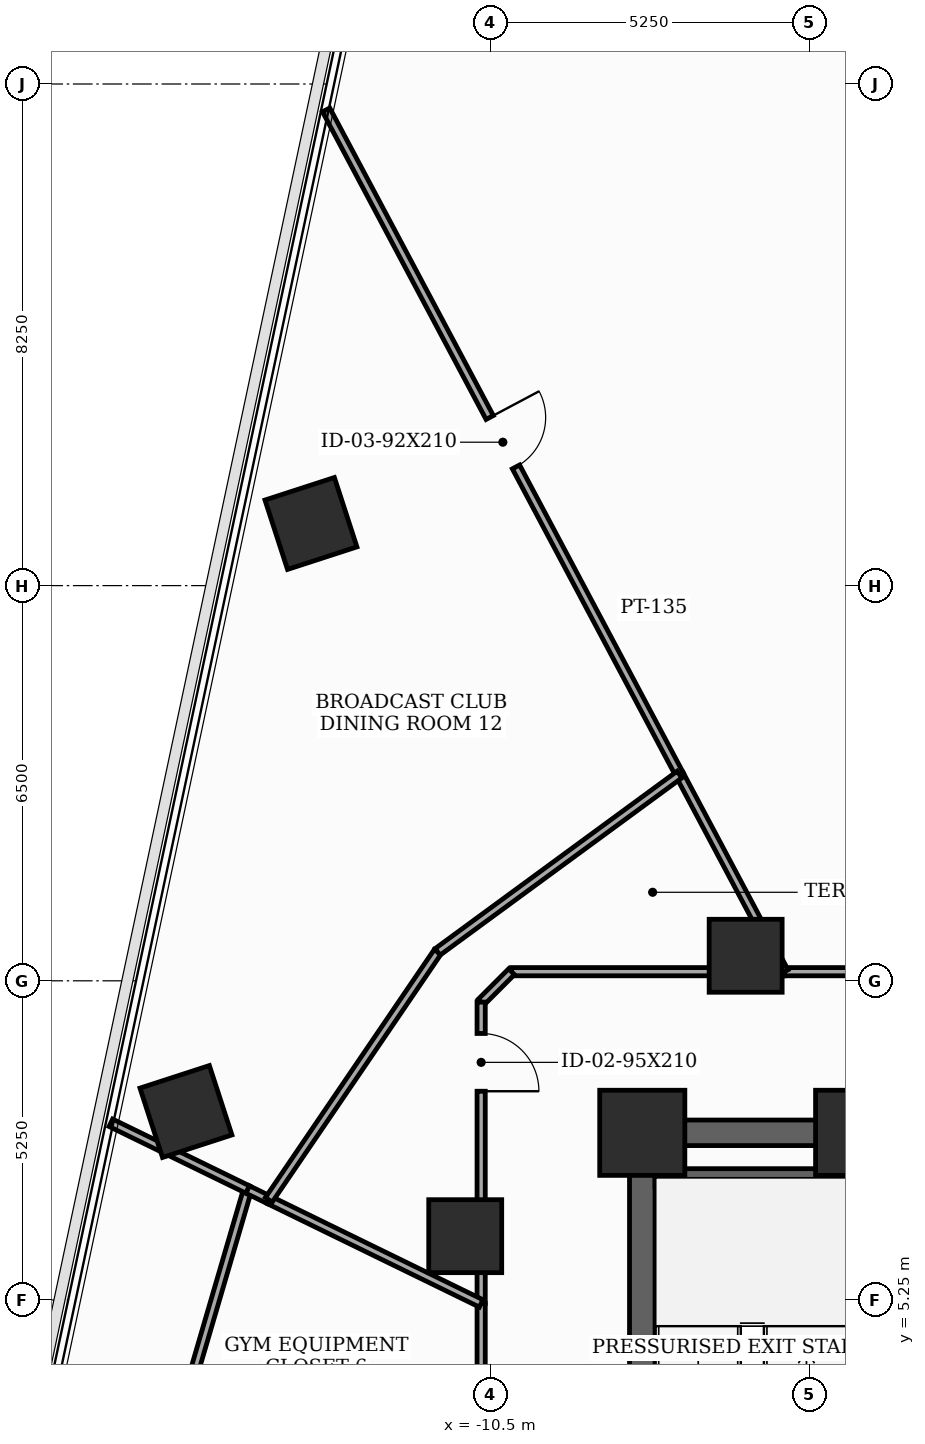
"""IFC4 building model, lengths in metres.
Left out: names, types, materials, properties, quantities, classifications, styles, units other than length and angle.
Written with IfcOpenShell. Run it as: python <this file> out.ifc"""

import sys

from ifc_helpers import new_model, si_unit, direction, frame, frame_2d, origin, origin_2d, place, context, subcontext, project, spatial, rectangle, extrude, element, fill, save


model = new_model("IFC4")
c1 = context("Model", 3, precision=1e-05, world=origin(), true_north=direction((0.0, 1.0)))
c2 = subcontext(c1, "Body", "Model", "MODEL_VIEW")
j1 = project(units=[si_unit("LENGTHUNIT", "METRE"), si_unit("PLANEANGLEUNIT", "RADIAN")], contexts=[c1])
p1 = place(None, origin())
s1 = spatial("IfcSite", under=j1, at=p1, CompositionType="ELEMENT")
p2 = place(p1, origin())
s2 = spatial("IfcBuilding", under=s1, at=p2, CompositionType="ELEMENT")
p3 = place(p2, frame((0.0, 0.0, 101.4)))
s3 = spatial("IfcBuildingStorey", under=s2, at=p3, CompositionType="ELEMENT", Elevation=101.4)
for number, where, z_axis, x_axis in (
    (1, (-4.45, 8.0, 0.0), (0.0, 0.0, 1.0), (1.0, 0.0, 0.0)),
    (2, (-8.0, 8.0, 0.0), (0.0, 0.0, 1.0), (1.0, 0.0, 0.0)),
):
    element("IfcColumn", number, at=place(p3, frame(where, z_axis=z_axis, x_axis=x_axis)), inside=s3, PredefinedType="COLUMN", context=c2, shape_type="SweptSolid", body=[
        extrude(rectangle(XDim=1.4, YDim=1.4, at=origin_2d()), origin(), (0.0, 0.0, 1.0), 3.7),
    ])
for number, where, z_axis, x_axis in (
    (3, (-6.3, 10.912, 0.0), (0.0, 0.0, 1.0), (1.0, 0.0, 0.0)),
    (4, (-10.912, 6.3, 0.0), (0.0, 0.0, 1.0), (1.0, 0.0, 0.0)),
    (5, (-13.449, 18.022, 0.0), (0.0, 0.0, 1.0), (0.951, 0.309, 0.0)),
    (6, (-15.505, 8.35, 0.0), (0.0, 0.0, 1.0), (0.951, 0.309, 0.0)),
):
    element("IfcColumn", number, at=place(p3, frame(where, z_axis=z_axis, x_axis=x_axis)), inside=s3, PredefinedType="COLUMN", context=c2, shape_type="SweptSolid", body=[
        extrude(rectangle(XDim=1.2, YDim=1.2, at=origin_2d()), origin(), (0.0, 0.0, 1.0), 3.7),
    ])
p4 = place(p3, frame((-8.0, -8.0, 0.0), z_axis=(0.0, 0.0, 1.0), x_axis=(0.0, 1.0, 0.0)))
e7 = element("IfcWall", 7, at=p4, inside=s3, PredefinedType="SHEAR", context=c2, shape_type="SweptSolid", body=[
    extrude(rectangle(XDim=16.0, YDim=0.42, at=frame_2d((8.0, 0.0))), origin(), (0.0, 0.0, 1.0), 3.5),
])
p5 = place(p4, frame((0.922, 0.0, 0.0)))
e8 = element("IfcOpeningElement", 8, at=p5, cuts=e7, PredefinedType="OPENING", context=c2, shape_type="SweptSolid", body=[
    extrude(rectangle(XDim=0.85, YDim=2.02, at=frame_2d((0.425, 1.01))), frame((0.0, 0.22, 0.0), z_axis=(0.0, -1.0, 0.0), x_axis=(1.0, 0.0, 0.0)), (0.0, 0.0, 1.0), 0.44),
])
p6 = place(p4, frame((5.35, 0.0, 0.0)))
e9 = element("IfcOpeningElement", 9, at=p6, cuts=e7, PredefinedType="OPENING", context=c2, shape_type="SweptSolid", body=[
    extrude(rectangle(XDim=1.05, YDim=2.15, at=frame_2d((0.525, 1.075))), frame((0.0, 0.22, 0.0), z_axis=(0.0, -1.0, 0.0), x_axis=(1.0, 0.0, 0.0)), (0.0, 0.0, 1.0), 0.44),
])
p7 = place(p3, frame((-8.0, 8.0, 0.0), z_axis=(0.0, 0.0, 1.0), x_axis=(1.0, 0.0, 0.0)))
e10 = element("IfcWall", 10, at=p7, inside=s3, PredefinedType="SHEAR", context=c2, shape_type="SweptSolid", body=[
    extrude(rectangle(XDim=16.0, YDim=0.42, at=frame_2d((8.0, 0.0))), origin(), (0.0, 0.0, 1.0), 3.5),
])
p8 = place(p7, frame((7.1, 0.0, 0.0)))
e11 = element("IfcOpeningElement", 11, at=p8, cuts=e10, PredefinedType="OPENING", context=c2, shape_type="SweptSolid", body=[
    extrude(rectangle(XDim=1.8, YDim=2.15, at=frame_2d((0.9, 1.075))), frame((0.0, 0.22, 0.0), z_axis=(0.0, -1.0, 0.0), x_axis=(1.0, 0.0, 0.0)), (0.0, 0.0, 1.0), 0.44),
])
p9 = place(p3, frame((-7.79, 7.26, 0.0), z_axis=(0.0, 0.0, 1.0), x_axis=(1.0, 0.0, 0.0)))
e12 = element("IfcWall", 12, at=p9, inside=s3, PredefinedType="SHEAR", context=c2, shape_type="SweptSolid", body=[
    extrude(rectangle(XDim=3.34, YDim=0.3, at=frame_2d((1.67, 0.0))), origin(), (0.0, 0.0, 1.0), 3.5),
])
p10 = place(p3, frame((-10.65, 5.194, 0.0), z_axis=(0.0, 0.0, 1.0), x_axis=(0.0, -1.0, 0.0)))
e13 = element("IfcWall", 13, at=p10, inside=s3, PredefinedType="PARTITIONING", context=c2, shape_type="SweptSolid", body=[
    extrude(rectangle(XDim=2.744, YDim=0.135, at=frame_2d((1.372, 0.0))), origin(), (0.0, 0.0, 1.0), 3.5),
])
p11 = place(p10, frame((1.226, 0.0, 0.0)))
e14 = element("IfcOpeningElement", 14, at=p11, cuts=e13, PredefinedType="OPENING", context=c2, shape_type="SweptSolid", body=[
    extrude(rectangle(XDim=0.95, YDim=2.1, at=frame_2d((0.475, 1.05))), frame((0.0, 0.077, 0.0), z_axis=(0.0, -1.0, 0.0), x_axis=(1.0, 0.0, 0.0)), (0.0, 0.0, 1.0), 0.155),
])
p12 = place(p3, frame((4.742, 10.65, 0.0), z_axis=(0.0, 0.0, 1.0), x_axis=(-1.0, 0.0, 0.0)))
e15 = element("IfcWall", 15, at=p12, inside=s3, PredefinedType="PARTITIONING", context=c2, shape_type="SweptSolid", body=[
    extrude(rectangle(XDim=10.405, YDim=0.135, at=frame_2d((5.203, 0.0))), origin(), (0.0, 0.0, 1.0), 2.785),
])
p13 = place(p12, frame((5.976, 0.0, 0.0)))
e16 = element("IfcOpeningElement", 16, at=p13, cuts=e15, PredefinedType="OPENING", context=c2, shape_type="SweptSolid", body=[
    extrude(rectangle(XDim=0.95, YDim=2.1, at=frame_2d((0.475, 1.05))), frame((0.0, 0.077, 0.0), z_axis=(0.0, -1.0, 0.0), x_axis=(1.0, 0.0, 0.0)), (0.0, 0.0, 1.0), 0.155),
])
p14 = place(p3, frame((-5.663, 10.65, 0.0), z_axis=(0.0, 0.0, 1.0), x_axis=(-1.0, 0.0, 0.0)))
e17 = element("IfcWall", 17, at=p14, inside=s3, PredefinedType="PARTITIONING", context=c2, shape_type="SweptSolid", body=[
    extrude(rectangle(XDim=4.487, YDim=0.135, at=frame_2d((2.243, 0.0))), origin(), (0.0, 0.0, 1.0), 2.785),
])
p15 = place(p3, frame((-10.15, 10.65, 0.0), z_axis=(0.0, 0.0, 1.0), x_axis=(-0.707106781187, -0.707106781187, 0.0)))
e18 = element("IfcWall", 18, at=p15, inside=s3, PredefinedType="PARTITIONING", context=c2, shape_type="SweptSolid", body=[
    extrude(rectangle(XDim=0.707, YDim=0.135, at=frame_2d((0.354, 0.0))), origin(), (0.0, 0.0, 1.0), 3.5),
])
p16 = place(p3, frame((-10.65, 10.15, 0.0), z_axis=(0.0, 0.0, 1.0), x_axis=(0.0, -1.0, 0.0)))
e19 = element("IfcWall", 19, at=p16, inside=s3, PredefinedType="PARTITIONING", context=c2, shape_type="SweptSolid", body=[
    extrude(rectangle(XDim=4.956, YDim=0.135, at=frame_2d((2.478, 0.0))), origin(), (0.0, 0.0, 1.0), 2.785),
])
p17 = place(p16, frame((0.516, 0.0, 0.0)))
e20 = element("IfcOpeningElement", 20, at=p17, cuts=e19, PredefinedType="OPENING", context=c2, shape_type="SweptSolid", body=[
    extrude(rectangle(XDim=0.95, YDim=2.1, at=frame_2d((0.475, 1.05))), frame((0.0, 0.077, 0.0), z_axis=(0.0, -1.0, 0.0), x_axis=(1.0, 0.0, 0.0)), (0.0, 0.0, 1.0), 0.155),
])
p18 = place(p3, frame((-14.491, 7.068, 0.0), z_axis=(0.0, 0.0, 1.0), x_axis=(-0.28111457881, -0.95967421221, 0.0)))
e21 = element("IfcWall", 21, at=p18, inside=s3, PredefinedType="PARTITIONING", context=c2, shape_type="SweptSolid", body=[
    extrude(rectangle(XDim=5.845, YDim=0.135, at=frame_2d((2.922, 0.0))), origin(), (0.0, 0.0, 1.0), 3.5),
])
p19 = place(p3, frame((-14.142, 6.898, 0.0), z_axis=(0.0, 0.0, 1.0), x_axis=(-0.898786579289, 0.438386456098, 0.0)))
e22 = element("IfcWall", 22, at=p19, inside=s3, PredefinedType="PARTITIONING", context=c2, shape_type="SweptSolid", body=[
    extrude(rectangle(XDim=0.388, YDim=0.135, at=frame_2d((0.194, 0.0))), origin(), (0.0, 0.0, 1.0), 3.5),
])
p20 = place(p3, frame((-10.65, 5.194, 0.0), z_axis=(0.0, 0.0, 1.0), x_axis=(-0.898732815367, 0.438496666558, 0.0)))
e23 = element("IfcWall", 23, at=p20, inside=s3, PredefinedType="PARTITIONING", context=c2, shape_type="SweptSolid", body=[
    extrude(rectangle(XDim=3.886, YDim=0.135, at=frame_2d((1.943, 0.0))), origin(), (0.0, 0.0, 1.0), 2.785),
])
p21 = place(p3, frame((-14.491, 7.068, 0.0), z_axis=(0.0, 0.0, 1.0), x_axis=(-0.898774071038, 0.438412099777, 0.0)))
e24 = element("IfcWall", 24, at=p21, inside=s3, PredefinedType="PARTITIONING", context=c2, shape_type="SweptSolid", body=[
    extrude(rectangle(XDim=2.503, YDim=0.135, at=frame_2d((1.251, 0.0))), origin(), (0.0, 0.0, 1.0), 2.935),
])
p22 = place(p3, frame((-13.199, 24.824, 0.0), z_axis=(0.0, 0.0, 1.0), x_axis=(0.46947528178, -0.882945615425, 0.0)))
e25 = element("IfcWall", 25, at=p22, inside=s3, PredefinedType="PARTITIONING", context=c2, shape_type="SweptSolid", body=[
    extrude(rectangle(XDim=12.38, YDim=0.135, at=frame_2d((6.19, 0.0))), origin(), (0.0, 0.0, 1.0), 2.935),
])
p23 = place(p22, frame((5.73, 0.0, 0.0)))
e26 = element("IfcOpeningElement", 26, at=p23, cuts=e25, PredefinedType="OPENING", context=c2, shape_type="SweptSolid", body=[
    extrude(rectangle(XDim=0.92, YDim=2.1, at=frame_2d((0.46, 1.05))), frame((0.0, 0.077, 0.0), z_axis=(0.0, -1.0, 0.0), x_axis=(1.0, 0.0, 0.0)), (0.0, 0.0, 1.0), 0.155),
])
p24 = place(p3, frame((-7.387, 13.893, 0.0), z_axis=(0.0, 0.0, 1.0), x_axis=(0.469356096826, -0.883008977515, 0.0)))
e27 = element("IfcWall", 27, at=p24, inside=s3, PredefinedType="PARTITIONING", context=c2, shape_type="SweptSolid", body=[
    extrude(rectangle(XDim=3.673, YDim=0.135, at=frame_2d((1.836, 0.0))), origin(), (0.0, 0.0, 1.0), 2.785),
])
p25 = place(p3, frame((-14.142, 6.898, 0.0), z_axis=(0.0, 0.0, 1.0), x_axis=(0.562725506953, 0.826643819202, 0.0)))
e28 = element("IfcWall", 28, at=p25, inside=s3, PredefinedType="PARTITIONING", context=c2, shape_type="SweptSolid", body=[
    extrude(rectangle(XDim=4.933, YDim=0.135, at=frame_2d((2.467, 0.0))), origin(), (0.0, 0.0, 1.0), 2.785),
])
p26 = place(p3, frame((-11.366, 10.976, 0.0), z_axis=(0.0, 0.0, 1.0), x_axis=(0.806496231999, 0.591239230576, 0.0)))
e29 = element("IfcWall", 29, at=p26, inside=s3, PredefinedType="PARTITIONING", context=c2, shape_type="SweptSolid", body=[
    extrude(rectangle(XDim=4.934, YDim=0.135, at=frame_2d((2.467, 0.0))), origin(), (0.0, 0.0, 1.0), 2.785),
])
p27 = place(p17, origin())
e30 = element("IfcDoor", 30, at=p27, inside=s3, OperationType="SINGLE_SWING_RIGHT", PredefinedType="DOOR", context=c2, shape_type="SweptSolid", body=[
    extrude(rectangle(XDim=0.95, YDim=2.1, at=frame_2d((0.475, 1.05))), frame((0.0, 0.025, 0.0), z_axis=(0.0, -1.0, 0.0), x_axis=(1.0, 0.0, 0.0)), (0.0, 0.0, 1.0), 0.05),
])
fill(e20, e30)
p28 = place(p23, origin())
e31 = element("IfcDoor", 31, at=p28, inside=s3, OperationType="SINGLE_SWING_LEFT", PredefinedType="DOOR", context=c2, shape_type="SweptSolid", body=[
    extrude(rectangle(XDim=0.92, YDim=2.1, at=frame_2d((0.46, 1.05))), frame((0.0, 0.025, 0.0), z_axis=(0.0, -1.0, 0.0), x_axis=(1.0, 0.0, 0.0)), (0.0, 0.0, 1.0), 0.05),
])
fill(e26, e31)
save(model, sys.argv[1])
